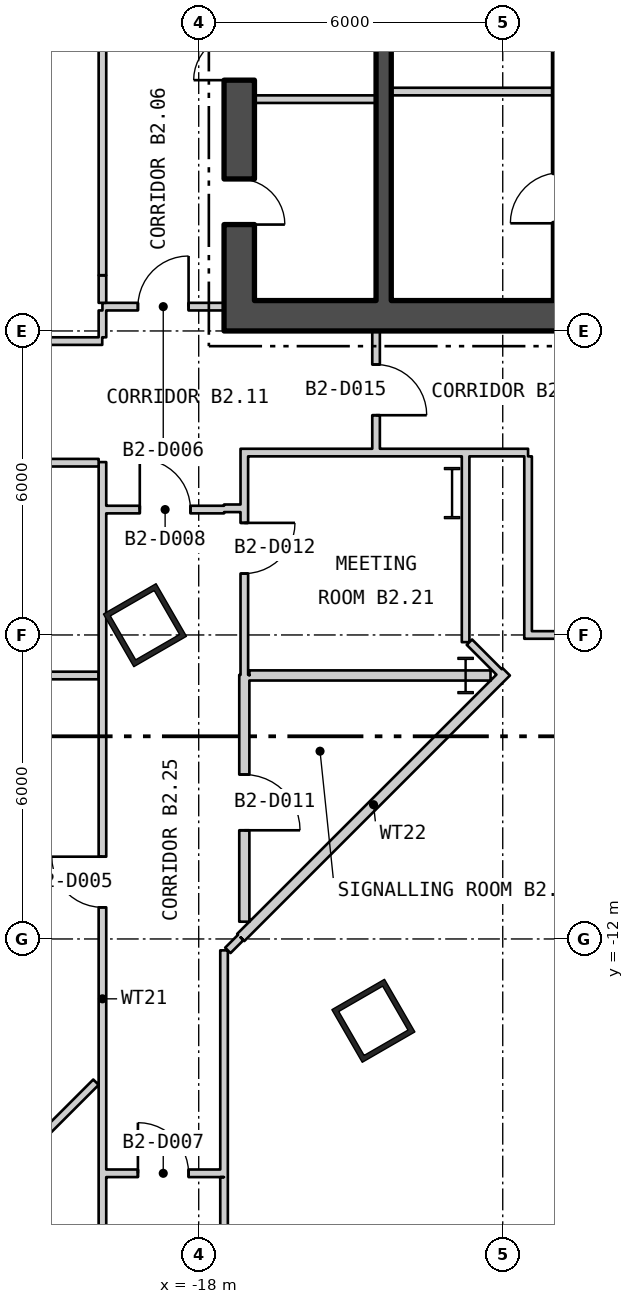
"""IFC4 building model, lengths in metres.
Left out: names, types, materials, properties, quantities, classifications, styles, units other than length and angle.
Written with IfcOpenShell. Run it as: python <this file> out.ifc"""

import sys

from ifc_helpers import new_model, si_unit, direction, frame, frame_2d, origin, origin_2d, place, context, subcontext, project, spatial, rectangle, hollow_rectangle, i_section, extrude, element, fill, save


model = new_model("IFC4")
c1 = context("Model", 3, precision=1e-05, world=origin(), true_north=direction((0.0, 1.0)))
c2 = subcontext(c1, "Body", "Model", "MODEL_VIEW")
j1 = project(units=[si_unit("LENGTHUNIT", "METRE"), si_unit("PLANEANGLEUNIT", "RADIAN")], contexts=[c1])
p1 = place(None, origin())
s1 = spatial("IfcSite", under=j1, at=p1, CompositionType="ELEMENT")
p2 = place(p1, origin())
s2 = spatial("IfcBuilding", under=s1, at=p2, CompositionType="ELEMENT")
p3 = place(p2, frame((0.0, 0.0, -11.4)))
s3 = spatial("IfcBuildingStorey", under=s2, at=p3, CompositionType="ELEMENT", Elevation=-11.4)
for number, where, z_axis, x_axis in (
    (1, (-19.061, -5.807, 0.0), (0.0, 0.0, 1.0), (0.5, -0.866, 0.0)),
    (2, (-14.553, -13.615, 0.0), (0.0, 0.0, 1.0), (0.5, -0.866, 0.0)),
):
    element("IfcColumn", number, at=place(p3, frame(where, z_axis=z_axis, x_axis=x_axis)), inside=s3, PredefinedType="COLUMN", context=c2, shape_type="SweptSolid", body=[
        extrude(hollow_rectangle(XDim=1.2, YDim=1.2, WallThickness=0.1, at=origin_2d()), origin(), (0.0, 0.0, 1.0), 5.7),
    ])
p4 = place(p3, frame((-13.0, -3.2, 0.0), z_axis=(0.0, 0.0, 1.0), x_axis=(1.0, 0.0, 0.0)))
e3 = element("IfcColumn", 3, at=p4, inside=s3, PredefinedType="COLUMN", context=c2, shape_type="SweptSolid", body=[
    extrude(i_section(OverallWidth=0.302, OverallDepth=1.008, WebThickness=0.021, FlangeThickness=0.04, at=origin_2d()), origin(), (0.0, 0.0, 1.0), 5.7),
])
p5 = place(p3, frame((-12.733, -6.8, 0.0), z_axis=(0.0, 0.0, 1.0), x_axis=(1.0, 0.0, 0.0)))
e4 = element("IfcColumn", 4, at=p5, inside=s3, PredefinedType="COLUMN", context=c2, shape_type="SweptSolid", body=[
    extrude(i_section(OverallWidth=0.304, OverallDepth=0.716, WebThickness=0.021, FlangeThickness=0.04, at=origin_2d()), origin(), (0.0, 0.0, 1.0), 5.7),
])
p6 = place(p3, frame((-17.5, 0.3, 0.0), z_axis=(0.0, 0.0, 1.0), x_axis=(1.0, 0.0, 0.0)))
e5 = element("IfcWall", 5, at=p6, inside=s3, PredefinedType="SHEAR", context=c2, shape_type="SweptSolid", body=[
    extrude(rectangle(XDim=35.0, YDim=0.6, at=frame_2d((17.5, 0.0))), origin(), (0.0, 0.0, 1.0), 5.25),
])
p7 = place(p6, frame((12.0, 0.0, 0.0)))
e6 = element("IfcOpeningElement", 6, at=p7, cuts=e5, PredefinedType="OPENING", context=c2, shape_type="SweptSolid", body=[
    extrude(rectangle(XDim=1.8, YDim=2.4, at=frame_2d((0.9, 1.2))), frame((0.0, 0.31, 0.0), z_axis=(0.0, -1.0, 0.0), x_axis=(1.0, 0.0, 0.0)), (0.0, 0.0, 1.0), 0.62),
])
p8 = place(p6, frame((22.0, 0.0, 0.0)))
e7 = element("IfcOpeningElement", 7, at=p8, cuts=e5, PredefinedType="OPENING", context=c2, shape_type="SweptSolid", body=[
    extrude(rectangle(XDim=1.8, YDim=2.4, at=frame_2d((0.9, 1.2))), frame((0.0, 0.31, 0.0), z_axis=(0.0, -1.0, 0.0), x_axis=(1.0, 0.0, 0.0)), (0.0, 0.0, 1.0), 0.62),
])
p9 = place(p3, frame((-17.2, 0.6, 0.0), z_axis=(0.0, 0.0, 1.0), x_axis=(0.0, 1.0, 0.0)))
e8 = element("IfcWall", 8, at=p9, inside=s3, PredefinedType="SHEAR", context=c2, shape_type="SweptSolid", body=[
    extrude(rectangle(XDim=16.8, YDim=0.6, at=frame_2d((8.4, 0.0))), origin(), (0.0, 0.0, 1.0), 5.25),
])
p10 = place(p9, frame((5.7, 0.0, 0.0)))
e9 = element("IfcOpeningElement", 9, at=p10, cuts=e8, PredefinedType="OPENING", context=c2, shape_type="SweptSolid", body=[
    extrude(rectangle(XDim=1.5, YDim=2.1, at=frame_2d((0.75, 1.05))), frame((0.0, 0.31, 0.0), z_axis=(0.0, -1.0, 0.0), x_axis=(1.0, 0.0, 0.0)), (0.0, 0.0, 1.0), 0.62),
])
p11 = place(p9, frame((1.5, 0.0, 0.0)))
e10 = element("IfcOpeningElement", 10, at=p11, cuts=e8, PredefinedType="OPENING", context=c2, shape_type="SweptSolid", body=[
    extrude(rectangle(XDim=0.9, YDim=2.1, at=frame_2d((0.45, 1.05))), frame((0.0, 0.31, 0.0), z_axis=(0.0, -1.0, 0.0), x_axis=(1.0, 0.0, 0.0)), (0.0, 0.0, 1.0), 0.62),
])
p12 = place(p9, frame((4.35, 0.0, 0.0)))
e11 = element("IfcOpeningElement", 11, at=p12, cuts=e8, PredefinedType="OPENING", context=c2, shape_type="SweptSolid", body=[
    extrude(rectangle(XDim=0.9, YDim=2.1, at=frame_2d((0.45, 1.05))), frame((0.0, 0.31, 0.0), z_axis=(0.0, -1.0, 0.0), x_axis=(1.0, 0.0, 0.0)), (0.0, 0.0, 1.0), 0.62),
])
p13 = place(p9, frame((8.423, 0.0, 0.0)))
e12 = element("IfcOpeningElement", 12, at=p13, cuts=e8, PredefinedType="OPENING", context=c2, shape_type="SweptSolid", body=[
    extrude(rectangle(XDim=1.0, YDim=2.1, at=frame_2d((0.5, 1.05))), frame((0.0, 0.31, 0.0), z_axis=(0.0, -1.0, 0.0), x_axis=(1.0, 0.0, 0.0)), (0.0, 0.0, 1.0), 0.62),
])
p14 = place(p9, frame((13.273, 0.0, 0.0)))
e13 = element("IfcOpeningElement", 13, at=p14, cuts=e8, PredefinedType="OPENING", context=c2, shape_type="SweptSolid", body=[
    extrude(rectangle(XDim=0.9, YDim=2.1, at=frame_2d((0.45, 1.05))), frame((0.0, 0.31, 0.0), z_axis=(0.0, -1.0, 0.0), x_axis=(1.0, 0.0, 0.0)), (0.0, 0.0, 1.0), 0.62),
])
p15 = place(p3, frame((-14.35, 0.6, 0.0), z_axis=(0.0, 0.0, 1.0), x_axis=(0.0, 1.0, 0.0)))
e14 = element("IfcWall", 14, at=p15, inside=s3, PredefinedType="SHEAR", context=c2, shape_type="SweptSolid", body=[
    extrude(rectangle(XDim=16.8, YDim=0.3, at=frame_2d((8.4, 0.0))), origin(), (0.0, 0.0, 1.0), 5.25),
])
p16 = place(p15, frame((5.7, 0.0, 0.0)))
e15 = element("IfcOpeningElement", 15, at=p16, cuts=e14, PredefinedType="OPENING", context=c2, shape_type="SweptSolid", body=[
    extrude(rectangle(XDim=1.5, YDim=2.1, at=frame_2d((0.75, 1.05))), frame((0.0, 0.16, 0.0), z_axis=(0.0, -1.0, 0.0), x_axis=(1.0, 0.0, 0.0)), (0.0, 0.0, 1.0), 0.32),
])
p17 = place(p3, frame((-14.2, 4.725, 0.0), z_axis=(0.0, 0.0, 1.0), x_axis=(1.0, 0.0, 0.0)))
e16 = element("IfcWall", 16, at=p17, inside=s3, PredefinedType="PARTITIONING", context=c2, shape_type="SweptSolid", body=[
    extrude(rectangle(XDim=3.2, YDim=0.15, at=frame_2d((1.6, 0.0))), origin(), (0.0, 0.0, 1.0), 5.25),
])
p18 = place(p3, frame((-16.9, 4.575, 0.0), z_axis=(0.0, 0.0, 1.0), x_axis=(1.0, 0.0, 0.0)))
e17 = element("IfcWall", 17, at=p18, inside=s3, PredefinedType="PARTITIONING", context=c2, shape_type="SweptSolid", body=[
    extrude(rectangle(XDim=2.4, YDim=0.15, at=frame_2d((1.2, 0.0))), origin(), (0.0, 0.0, 1.0), 5.25),
])
p19 = place(p3, frame((-26.75, -6.8, 0.0), z_axis=(0.0, 0.0, 1.0), x_axis=(1.0, 0.0, 0.0)))
e18 = element("IfcWall", 18, at=p19, inside=s3, PredefinedType="PARTITIONING", context=c2, shape_type="SweptSolid", body=[
    extrude(rectangle(XDim=6.775, YDim=0.15, at=frame_2d((3.388, 0.0))), origin(), (0.0, 0.0, 1.0), 5.25),
])
p20 = place(p3, frame((-26.75, -0.2, 0.0), z_axis=(0.0, 0.0, 1.0), x_axis=(1.0, 0.0, 0.0)))
e19 = element("IfcWall", 19, at=p20, inside=s3, PredefinedType="PARTITIONING", context=c2, shape_type="SweptSolid", body=[
    extrude(rectangle(XDim=6.846, YDim=0.15, at=frame_2d((3.423, 0.0))), origin(), (0.0, 0.0, 1.0), 5.25),
])
p21 = place(p20, frame((3.982, 0.0, 0.0)))
e20 = element("IfcOpeningElement", 20, at=p21, cuts=e19, PredefinedType="OPENING", context=c2, shape_type="SweptSolid", body=[
    extrude(rectangle(XDim=1.0, YDim=2.1, at=frame_2d((0.5, 1.05))), frame((0.0, 0.085, 0.0), z_axis=(0.0, -1.0, 0.0), x_axis=(1.0, 0.0, 0.0)), (0.0, 0.0, 1.0), 0.17),
])
p22 = place(p3, frame((-25.026, -19.825, 0.0), z_axis=(0.0, 0.0, 1.0), x_axis=(0.707106781187, 0.707106781187, 0.0)))
e21 = element("IfcWall", 21, at=p22, inside=s3, PredefinedType="PARTITIONING", context=c2, shape_type="SweptSolid", body=[
    extrude(rectangle(XDim=7.068, YDim=0.15, at=frame_2d((3.534, 0.0))), origin(), (0.0, 0.0, 1.0), 5.25),
])
p23 = place(p3, frame((-24.55, -2.6, 0.0), z_axis=(0.0, 0.0, 1.0), x_axis=(1.0, 0.0, 0.0)))
e22 = element("IfcWall", 22, at=p23, inside=s3, PredefinedType="PARTITIONING", context=c2, shape_type="SweptSolid", body=[
    extrude(rectangle(XDim=4.575, YDim=0.15, at=frame_2d((2.288, 0.0))), origin(), (0.0, 0.0, 1.0), 5.25),
])
p24 = place(p23, frame((1.736, 0.0, 0.0)))
e23 = element("IfcOpeningElement", 23, at=p24, cuts=e22, PredefinedType="OPENING", context=c2, shape_type="SweptSolid", body=[
    extrude(rectangle(XDim=1.0, YDim=2.1, at=frame_2d((0.5, 1.05))), frame((0.0, 0.085, 0.0), z_axis=(0.0, -1.0, 0.0), x_axis=(1.0, 0.0, 0.0)), (0.0, 0.0, 1.0), 0.17),
])
p25 = place(p3, frame((-19.9, -23.775, 0.0), z_axis=(0.0, 0.0, 1.0), x_axis=(0.0, 1.0, 0.0)))
e24 = element("IfcWall", 24, at=p25, inside=s3, PredefinedType="PARTITIONING", context=c2, shape_type="SweptSolid", body=[
    extrude(rectangle(XDim=21.187, YDim=0.15, at=frame_2d((10.594, 0.0))), origin(), (0.0, 0.0, 1.0), 5.25),
])
p26 = place(p25, frame((2.993, 0.0, 0.0)))
e25 = element("IfcOpeningElement", 25, at=p26, cuts=e24, PredefinedType="OPENING", context=c2, shape_type="SweptSolid", body=[
    extrude(rectangle(XDim=1.0, YDim=2.1, at=frame_2d((0.5, 1.05))), frame((0.0, 0.085, 0.0), z_axis=(0.0, -1.0, 0.0), x_axis=(1.0, 0.0, 0.0)), (0.0, 0.0, 1.0), 0.17),
])
p27 = place(p25, frame((12.399, 0.0, 0.0)))
e26 = element("IfcOpeningElement", 26, at=p27, cuts=e24, PredefinedType="OPENING", context=c2, shape_type="SweptSolid", body=[
    extrude(rectangle(XDim=1.0, YDim=2.1, at=frame_2d((0.5, 1.05))), frame((0.0, 0.085, 0.0), z_axis=(0.0, -1.0, 0.0), x_axis=(1.0, 0.0, 0.0)), (0.0, 0.0, 1.0), 0.17),
])
p28 = place(p3, frame((-19.9, -0.125, 0.0), z_axis=(0.0, 0.0, 1.0), x_axis=(0.0, 1.0, 0.0)))
e27 = element("IfcWall", 27, at=p28, inside=s3, PredefinedType="PARTITIONING", context=c2, shape_type="SweptSolid", body=[
    extrude(rectangle(XDim=0.53, YDim=0.15, at=frame_2d((0.265, 0.0))), origin(), (0.0, 0.0, 1.0), 5.25),
])
p29 = place(p3, frame((-19.9, 0.48, 0.0), z_axis=(0.0, 0.0, 1.0), x_axis=(1.0, 0.0, 0.0)))
e28 = element("IfcWall", 28, at=p29, inside=s3, PredefinedType="PARTITIONING", context=c2, shape_type="SweptSolid", body=[
    extrude(rectangle(XDim=2.4, YDim=0.15, at=frame_2d((1.2, 0.0))), origin(), (0.0, 0.0, 1.0), 5.25),
])
p30 = place(p29, frame((0.7, 0.0, 0.0)))
e29 = element("IfcOpeningElement", 29, at=p30, cuts=e28, PredefinedType="OPENING", context=c2, shape_type="SweptSolid", body=[
    extrude(rectangle(XDim=1.0, YDim=2.1, at=frame_2d((0.5, 1.05))), frame((0.0, 0.085, 0.0), z_axis=(0.0, -1.0, 0.0), x_axis=(1.0, 0.0, 0.0)), (0.0, 0.0, 1.0), 0.17),
])
p31 = place(p3, frame((-19.9, 0.555, 0.0), z_axis=(0.0, 0.0, 1.0), x_axis=(0.0, 1.0, 0.0)))
e30 = element("IfcWall", 30, at=p31, inside=s3, PredefinedType="PARTITIONING", context=c2, shape_type="SweptSolid", body=[
    extrude(rectangle(XDim=0.541, YDim=0.15, at=frame_2d((0.271, 0.0))), origin(), (0.0, 0.0, 1.0), 5.25),
])
p32 = place(p3, frame((-19.9, 1.101, 0.0), z_axis=(0.0, 0.0, 1.0), x_axis=(0.0, 1.0, 0.0)))
e31 = element("IfcWall", 31, at=p32, inside=s3, PredefinedType="PARTITIONING", context=c2, shape_type="SweptSolid", body=[
    extrude(rectangle(XDim=16.824, YDim=0.15, at=frame_2d((8.412, 0.0))), origin(), (0.0, 0.0, 1.0), 5.25),
])
p33 = place(p3, frame((-19.825, -16.625, 0.0), z_axis=(0.0, 0.0, 1.0), x_axis=(1.0, 0.0, 0.0)))
e32 = element("IfcWall", 32, at=p33, inside=s3, PredefinedType="PARTITIONING", context=c2, shape_type="SweptSolid", body=[
    extrude(rectangle(XDim=2.25, YDim=0.15, at=frame_2d((1.125, 0.0))), origin(), (0.0, 0.0, 1.0), 5.25),
])
p34 = place(p33, frame((0.625, 0.0, 0.0)))
e33 = element("IfcOpeningElement", 33, at=p34, cuts=e32, PredefinedType="OPENING", context=c2, shape_type="SweptSolid", body=[
    extrude(rectangle(XDim=1.0, YDim=2.1, at=frame_2d((0.5, 1.05))), frame((0.0, 0.085, 0.0), z_axis=(0.0, -1.0, 0.0), x_axis=(1.0, 0.0, 0.0)), (0.0, 0.0, 1.0), 0.17),
])
p35 = place(p3, frame((-19.825, -3.525, 0.0), z_axis=(0.0, 0.0, 1.0), x_axis=(1.0, 0.0, 0.0)))
e34 = element("IfcWall", 34, at=p35, inside=s3, PredefinedType="PARTITIONING", context=c2, shape_type="SweptSolid", body=[
    extrude(rectangle(XDim=2.325, YDim=0.15, at=frame_2d((1.163, 0.0))), origin(), (0.0, 0.0, 1.0), 5.25),
])
p36 = place(p35, frame((0.662, 0.0, 0.0)))
e35 = element("IfcOpeningElement", 35, at=p36, cuts=e34, PredefinedType="OPENING", context=c2, shape_type="SweptSolid", body=[
    extrude(rectangle(XDim=1.0, YDim=2.1, at=frame_2d((0.5, 1.05))), frame((0.0, 0.085, 0.0), z_axis=(0.0, -1.0, 0.0), x_axis=(1.0, 0.0, 0.0)), (0.0, 0.0, 1.0), 0.17),
])
p37 = place(p3, frame((-17.5, -16.7, 0.0), z_axis=(0.0, 0.0, 1.0), x_axis=(0.0, 1.0, 0.0)))
e36 = element("IfcWall", 36, at=p37, inside=s3, PredefinedType="PARTITIONING", context=c2, shape_type="SweptSolid", body=[
    extrude(rectangle(XDim=4.475, YDim=0.15, at=frame_2d((2.237, 0.0))), origin(), (0.0, 0.0, 1.0), 5.25),
])
p38 = place(p3, frame((-17.5, -3.5, 0.0), z_axis=(0.0, 0.0, 1.0), x_axis=(1.0, 0.0, 0.0)))
e37 = element("IfcWall", 37, at=p38, inside=s3, PredefinedType="PARTITIONING", context=c2, shape_type="SweptSolid", body=[
    extrude(rectangle(XDim=0.325, YDim=0.15, at=frame_2d((0.163, 0.0))), origin(), (0.0, 0.0, 1.0), 5.25),
])
p39 = place(p3, frame((-17.5, -16.7, 0.0), z_axis=(0.0, 0.0, 1.0), x_axis=(0.000262260678, -0.99999996561, 0.0)))
e38 = element("IfcWall", 38, at=p39, inside=s3, PredefinedType="PARTITIONING", context=c2, shape_type="SweptSolid", body=[
    extrude(rectangle(XDim=3.813, YDim=0.15, at=frame_2d((1.907, 0.0))), origin(), (0.0, 0.0, 1.0), 5.25),
])
p40 = place(p3, frame((-17.425, -12.225, 0.0), z_axis=(0.0, 0.0, 1.0), x_axis=(0.707106781187, 0.707106781187, 0.0)))
e39 = element("IfcWall", 39, at=p40, inside=s3, PredefinedType="PARTITIONING", context=c2, shape_type="SweptSolid", body=[
    extrude(rectangle(XDim=0.359, YDim=0.15, at=frame_2d((0.18, 0.0))), origin(), (0.0, 0.0, 1.0), 5.25),
])
p41 = place(p3, frame((-17.175, -2.4, 0.0), z_axis=(0.0, 0.0, 1.0), x_axis=(1.0, 0.0, 0.0)))
e40 = element("IfcWall", 40, at=p41, inside=s3, PredefinedType="PARTITIONING", context=c2, shape_type="SweptSolid", body=[
    extrude(rectangle(XDim=5.675, YDim=0.15, at=frame_2d((2.837, 0.0))), origin(), (0.0, 0.0, 1.0), 5.25),
])
p42 = place(p3, frame((-17.171, -11.971, 0.0), z_axis=(0.0, 0.0, 1.0), x_axis=(0.707106781187, 0.707106781187, 0.0)))
e41 = element("IfcWall", 41, at=p42, inside=s3, PredefinedType="PARTITIONING", context=c2, shape_type="SweptSolid", body=[
    extrude(rectangle(XDim=7.413, YDim=0.2, at=frame_2d((3.707, 0.0))), origin(), (0.0, 0.0, 1.0), 5.25),
])
p43 = place(p3, frame((-17.1, -11.659, 0.0), z_axis=(0.0, 0.0, 1.0), x_axis=(0.0, 1.0, 0.0)))
e42 = element("IfcWall", 42, at=p43, inside=s3, PredefinedType="PARTITIONING", context=c2, shape_type="SweptSolid", body=[
    extrude(rectangle(XDim=4.871, YDim=0.2, at=frame_2d((2.436, 0.0))), origin(), (0.0, 0.0, 1.0), 5.25),
])
p44 = place(p43, frame((1.804, 0.0, 0.0)))
e43 = element("IfcOpeningElement", 43, at=p44, cuts=e42, PredefinedType="OPENING", context=c2, shape_type="SweptSolid", body=[
    extrude(rectangle(XDim=1.1, YDim=2.1, at=frame_2d((0.55, 1.05))), frame((0.0, 0.11, 0.0), z_axis=(0.0, -1.0, 0.0), x_axis=(1.0, 0.0, 0.0)), (0.0, 0.0, 1.0), 0.22),
])
p45 = place(p3, frame((-17.1, -6.788, 0.0), z_axis=(0.0, 0.0, 1.0), x_axis=(0.0, 1.0, 0.0)))
e44 = element("IfcWall", 44, at=p45, inside=s3, PredefinedType="PARTITIONING", context=c2, shape_type="SweptSolid", body=[
    extrude(rectangle(XDim=4.313, YDim=0.15, at=frame_2d((2.156, 0.0))), origin(), (0.0, 0.0, 1.0), 5.25),
])
p46 = place(p45, frame((2.0, 0.0, 0.0)))
e45 = element("IfcOpeningElement", 45, at=p46, cuts=e44, PredefinedType="OPENING", context=c2, shape_type="SweptSolid", body=[
    extrude(rectangle(XDim=1.0, YDim=2.1, at=frame_2d((0.5, 1.05))), frame((0.0, 0.085, 0.0), z_axis=(0.0, -1.0, 0.0), x_axis=(1.0, 0.0, 0.0)), (0.0, 0.0, 1.0), 0.17),
])
p47 = place(p3, frame((-17.0, -6.799, 0.0), z_axis=(0.0, 0.0, 1.0), x_axis=(0.999999977923, -0.000210128174, 0.0)))
e46 = element("IfcWall", 46, at=p47, inside=s3, PredefinedType="PARTITIONING", context=c2, shape_type="SweptSolid", body=[
    extrude(rectangle(XDim=4.759, YDim=0.2, at=frame_2d((2.38, 0.0))), origin(), (0.0, 0.0, 1.0), 5.25),
])
p48 = place(p3, frame((-14.5, -2.325, 0.0), z_axis=(0.0, 0.0, 1.0), x_axis=(0.0, 1.0, 0.0)))
e47 = element("IfcWall", 47, at=p48, inside=s3, PredefinedType="PARTITIONING", context=c2, shape_type="SweptSolid", body=[
    extrude(rectangle(XDim=2.325, YDim=0.15, at=frame_2d((1.163, 0.0))), origin(), (0.0, 0.0, 1.0), 5.25),
])
p49 = place(p48, frame((0.662, 0.0, 0.0)))
e48 = element("IfcOpeningElement", 48, at=p49, cuts=e47, PredefinedType="OPENING", context=c2, shape_type="SweptSolid", body=[
    extrude(rectangle(XDim=1.0, YDim=2.1, at=frame_2d((0.5, 1.05))), frame((0.0, 0.085, 0.0), z_axis=(0.0, -1.0, 0.0), x_axis=(1.0, 0.0, 0.0)), (0.0, 0.0, 1.0), 0.17),
])
p50 = place(p3, frame((-12.733, -6.142, 0.0), z_axis=(0.0, 0.0, 1.0), x_axis=(0.0, 1.0, 0.0)))
e49 = element("IfcWall", 49, at=p50, inside=s3, PredefinedType="PARTITIONING", context=c2, shape_type="SweptSolid", body=[
    extrude(rectangle(XDim=3.667, YDim=0.15, at=frame_2d((1.833, 0.0))), origin(), (0.0, 0.0, 1.0), 5.25),
])
p51 = place(p3, frame((-12.658, -6.142, 0.0), z_axis=(0.0, 0.0, 1.0), x_axis=(0.706504732317, -0.707708317892, 0.0)))
e50 = element("IfcWall", 50, at=p51, inside=s3, PredefinedType="PARTITIONING", context=c2, shape_type="SweptSolid", body=[
    extrude(rectangle(XDim=0.831, YDim=0.15, at=frame_2d((0.415, 0.0))), origin(), (0.0, 0.0, 1.0), 5.25),
])
p52 = place(p3, frame((-11.5, -6.075, 0.0), z_axis=(0.0, 0.0, 1.0), x_axis=(0.0, 1.0, 0.0)))
e51 = element("IfcWall", 51, at=p52, inside=s3, PredefinedType="PARTITIONING", context=c2, shape_type="SweptSolid", body=[
    extrude(rectangle(XDim=3.6, YDim=0.15, at=frame_2d((1.8, 0.0))), origin(), (0.0, 0.0, 1.0), 5.25),
])
p53 = place(p3, frame((-11.425, -6.0, 0.0), z_axis=(0.0, 0.0, 1.0), x_axis=(1.0, 0.0, 0.0)))
e52 = element("IfcWall", 52, at=p53, inside=s3, PredefinedType="PARTITIONING", context=c2, shape_type="SweptSolid", body=[
    extrude(rectangle(XDim=2.3, YDim=0.15, at=frame_2d((1.15, 0.0))), origin(), (0.0, 0.0, 1.0), 5.25),
])
p54 = place(p11, origin())
e53 = element("IfcDoor", 53, at=p54, inside=s3, OperationType="SINGLE_SWING_LEFT", PredefinedType="DOOR", context=c2, shape_type="SweptSolid", body=[
    extrude(rectangle(XDim=0.9, YDim=2.1, at=frame_2d((0.45, 1.05))), frame((0.0, 0.025, 0.0), z_axis=(0.0, -1.0, 0.0), x_axis=(1.0, 0.0, 0.0)), (0.0, 0.0, 1.0), 0.05),
])
fill(e10, e53)
p55 = place(p12, origin())
e54 = element("IfcDoor", 54, at=p55, inside=s3, OperationType="SINGLE_SWING_RIGHT", PredefinedType="DOOR", context=c2, shape_type="SweptSolid", body=[
    extrude(rectangle(XDim=0.9, YDim=2.1, at=frame_2d((0.45, 1.05))), frame((0.0, 0.025, 0.0), z_axis=(0.0, -1.0, 0.0), x_axis=(1.0, 0.0, 0.0)), (0.0, 0.0, 1.0), 0.05),
])
fill(e11, e54)
p56 = place(p27, origin())
e55 = element("IfcDoor", 55, at=p56, inside=s3, OperationType="SINGLE_SWING_LEFT", PredefinedType="DOOR", context=c2, shape_type="SweptSolid", body=[
    extrude(rectangle(XDim=1.0, YDim=2.1, at=frame_2d((0.5, 1.05))), frame((0.0, 0.025, 0.0), z_axis=(0.0, -1.0, 0.0), x_axis=(1.0, 0.0, 0.0)), (0.0, 0.0, 1.0), 0.05),
])
fill(e26, e55)
p57 = place(p30, origin())
e56 = element("IfcDoor", 56, at=p57, inside=s3, OperationType="SINGLE_SWING_LEFT", PredefinedType="DOOR", context=c2, shape_type="SweptSolid", body=[
    extrude(rectangle(XDim=1.0, YDim=2.1, at=frame_2d((0.5, 1.05))), frame((0.0, 0.025, 0.0), z_axis=(0.0, -1.0, 0.0), x_axis=(1.0, 0.0, 0.0)), (0.0, 0.0, 1.0), 0.05),
])
fill(e29, e56)
p58 = place(p34, origin())
e57 = element("IfcDoor", 57, at=p58, inside=s3, OperationType="SINGLE_SWING_RIGHT", PredefinedType="DOOR", context=c2, shape_type="SweptSolid", body=[
    extrude(rectangle(XDim=1.0, YDim=2.1, at=frame_2d((0.5, 1.05))), frame((0.0, 0.025, 0.0), z_axis=(0.0, -1.0, 0.0), x_axis=(1.0, 0.0, 0.0)), (0.0, 0.0, 1.0), 0.05),
])
fill(e33, e57)
p59 = place(p36, origin())
e58 = element("IfcDoor", 58, at=p59, inside=s3, OperationType="SINGLE_SWING_RIGHT", PredefinedType="DOOR", context=c2, shape_type="SweptSolid", body=[
    extrude(rectangle(XDim=1.0, YDim=2.1, at=frame_2d((0.5, 1.05))), frame((0.0, 0.025, 0.0), z_axis=(0.0, -1.0, 0.0), x_axis=(1.0, 0.0, 0.0)), (0.0, 0.0, 1.0), 0.05),
])
fill(e35, e58)
p60 = place(p44, origin())
e59 = element("IfcDoor", 59, at=p60, inside=s3, OperationType="SINGLE_SWING_LEFT", PredefinedType="DOOR", context=c2, shape_type="SweptSolid", body=[
    extrude(rectangle(XDim=1.1, YDim=2.1, at=frame_2d((0.55, 1.05))), frame((0.0, 0.025, 0.0), z_axis=(0.0, -1.0, 0.0), x_axis=(1.0, 0.0, 0.0)), (0.0, 0.0, 1.0), 0.05),
])
fill(e43, e59)
p61 = place(p46, origin())
e60 = element("IfcDoor", 60, at=p61, inside=s3, OperationType="SINGLE_SWING_RIGHT", PredefinedType="DOOR", context=c2, shape_type="SweptSolid", body=[
    extrude(rectangle(XDim=1.0, YDim=2.1, at=frame_2d((0.5, 1.05))), frame((0.0, 0.025, 0.0), z_axis=(0.0, -1.0, 0.0), x_axis=(1.0, 0.0, 0.0)), (0.0, 0.0, 1.0), 0.05),
])
fill(e45, e60)
p62 = place(p49, origin())
e61 = element("IfcDoor", 61, at=p62, inside=s3, OperationType="SINGLE_SWING_LEFT", PredefinedType="DOOR", context=c2, shape_type="SweptSolid", body=[
    extrude(rectangle(XDim=1.0, YDim=2.1, at=frame_2d((0.5, 1.05))), frame((0.0, 0.025, 0.0), z_axis=(0.0, -1.0, 0.0), x_axis=(1.0, 0.0, 0.0)), (0.0, 0.0, 1.0), 0.05),
])
fill(e48, e61)
save(model, sys.argv[1])
